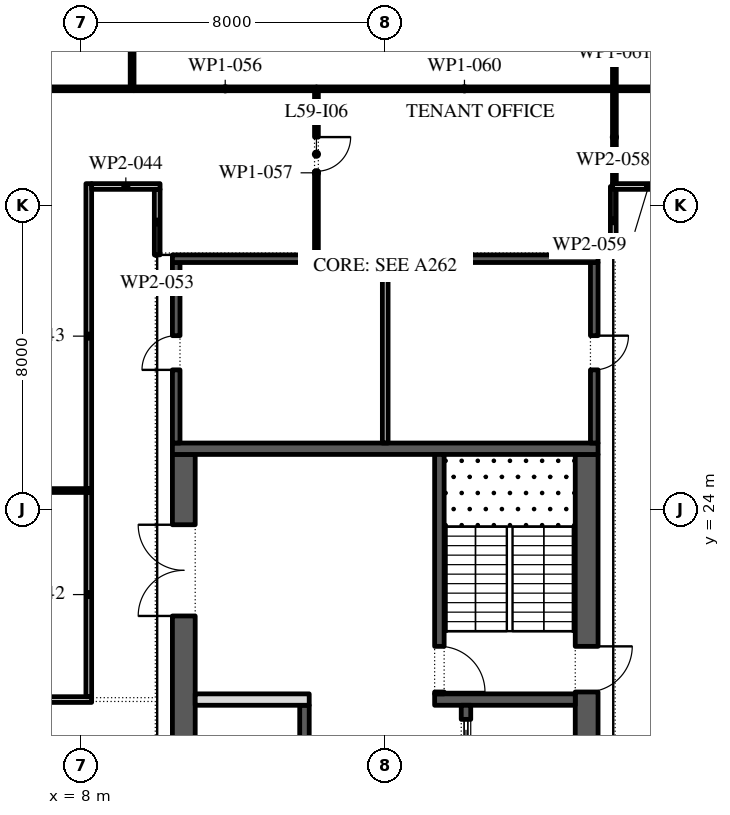
"""IFC4 building model, lengths in metres.
Left out: names, types, materials, properties, quantities, classifications, styles, units other than length and angle.
Written with IfcOpenShell. Run it as: python <this file> out.ifc"""

import sys

from ifc_helpers import new_model, si_unit, direction, frame, frame_2d, origin, place, context, subcontext, project, spatial, rectangle, extrude, element, fill, save


model = new_model("IFC4")
c1 = context("Model", 3, precision=1e-05, world=origin(), true_north=direction((0.0, 1.0)))
c2 = subcontext(c1, "Body", "Model", "MODEL_VIEW")
j1 = project(units=[si_unit("LENGTHUNIT", "METRE"), si_unit("PLANEANGLEUNIT", "RADIAN")], contexts=[c1])
p1 = place(None, origin())
s1 = spatial("IfcSite", under=j1, at=p1, CompositionType="ELEMENT")
p2 = place(p1, origin())
s2 = spatial("IfcBuilding", under=s1, at=p2, CompositionType="ELEMENT")
p3 = place(p2, frame((0.0, 0.0, 272.4)))
s3 = spatial("IfcBuildingStorey", under=s2, at=p3, CompositionType="ELEMENT", Elevation=272.4)
p4 = place(p3, frame((21.359, -11.678, 0.0), z_axis=(0.0, 0.0, 1.0), x_axis=(0.224949198343, 0.974370493275, 0.0)))
e1 = element("IfcWall", 1, at=p4, inside=s3, PredefinedType="STANDARD", context=c2, shape_type="SweptSolid", body=[
    extrude(rectangle(XDim=49.5, YDim=0.3, at=frame_2d((24.75, 0.0))), origin(), (0.0, 0.0, 1.0), 4.0),
])
p5 = place(p4, frame((1.157, 0.0, 0.45)))
e2 = element("IfcOpeningElement", 2, at=p5, cuts=e1, PredefinedType="OPENING", context=c2, shape_type="SweptSolid", body=[
    extrude(rectangle(XDim=4.5, YDim=3.05, at=frame_2d((2.25, 1.525))), frame((0.0, 0.16, 0.0), z_axis=(0.0, -1.0, 0.0), x_axis=(1.0, 0.0, 0.0)), (0.0, 0.0, 1.0), 0.32),
])
p6 = place(p4, frame((8.121, 0.0, 0.45)))
e3 = element("IfcOpeningElement", 3, at=p6, cuts=e1, PredefinedType="OPENING", context=c2, shape_type="SweptSolid", body=[
    extrude(rectangle(XDim=4.5, YDim=3.05, at=frame_2d((2.25, 1.525))), frame((0.0, 0.16, 0.0), z_axis=(0.0, -1.0, 0.0), x_axis=(1.0, 0.0, 0.0)), (0.0, 0.0, 1.0), 0.32),
])
p7 = place(p4, frame((15.236, 0.0, 0.45)))
e4 = element("IfcOpeningElement", 4, at=p7, cuts=e1, PredefinedType="OPENING", context=c2, shape_type="SweptSolid", body=[
    extrude(rectangle(XDim=4.5, YDim=3.05, at=frame_2d((2.25, 1.525))), frame((0.0, 0.16, 0.0), z_axis=(0.0, -1.0, 0.0), x_axis=(1.0, 0.0, 0.0)), (0.0, 0.0, 1.0), 0.32),
])
p8 = place(p4, frame((22.35, 0.0, 0.45)))
e5 = element("IfcOpeningElement", 5, at=p8, cuts=e1, PredefinedType="OPENING", context=c2, shape_type="SweptSolid", body=[
    extrude(rectangle(XDim=4.5, YDim=3.05, at=frame_2d((2.25, 1.525))), frame((0.0, 0.16, 0.0), z_axis=(0.0, -1.0, 0.0), x_axis=(1.0, 0.0, 0.0)), (0.0, 0.0, 1.0), 0.32),
])
p9 = place(p4, frame((29.464, 0.0, 0.45)))
e6 = element("IfcOpeningElement", 6, at=p9, cuts=e1, PredefinedType="OPENING", context=c2, shape_type="SweptSolid", body=[
    extrude(rectangle(XDim=4.5, YDim=2.95, at=frame_2d((2.25, 1.475))), frame((0.0, 0.16, 0.0), z_axis=(0.0, -1.0, 0.0), x_axis=(1.0, 0.0, 0.0)), (0.0, 0.0, 1.0), 0.32),
])
p10 = place(p4, frame((37.628, 0.0, 0.0)))
e7 = element("IfcOpeningElement", 7, at=p10, cuts=e1, PredefinedType="OPENING", context=c2, shape_type="SweptSolid", body=[
    extrude(rectangle(XDim=2.4, YDim=3.325, at=frame_2d((1.2, 1.663))), frame((0.0, 0.16, 0.0), z_axis=(0.0, -1.0, 0.0), x_axis=(1.0, 0.0, 0.0)), (0.0, 0.0, 1.0), 0.32),
])
p11 = place(p4, frame((43.693, 0.0, 0.45)))
e8 = element("IfcOpeningElement", 8, at=p11, cuts=e1, PredefinedType="OPENING", context=c2, shape_type="SweptSolid", body=[
    extrude(rectangle(XDim=4.5, YDim=3.05, at=frame_2d((2.25, 1.525))), frame((0.0, 0.16, 0.0), z_axis=(0.0, -1.0, 0.0), x_axis=(1.0, 0.0, 0.0)), (0.0, 0.0, 1.0), 0.32),
])
p12 = place(p3, frame((21.3, -2.45, 0.0), z_axis=(0.0, 0.0, 1.0), x_axis=(0.0, 1.0, 0.0)))
e9 = element("IfcWall", 9, at=p12, inside=s3, PredefinedType="SHEAR", context=c2, shape_type="SweptSolid", body=[
    extrude(rectangle(XDim=27.9, YDim=0.6, at=frame_2d((13.95, 0.0))), origin(), (0.0, 0.0, 1.0), 4.0),
])
p13 = place(p12, frame((5.05, 0.0, 0.0)))
e10 = element("IfcOpeningElement", 10, at=p13, cuts=e9, PredefinedType="OPENING", context=c2, shape_type="SweptSolid", body=[
    extrude(rectangle(XDim=1.2, YDim=2.1, at=frame_2d((0.6, 1.05))), frame((0.0, 0.31, 0.0), z_axis=(0.0, -1.0, 0.0), x_axis=(1.0, 0.0, 0.0)), (0.0, 0.0, 1.0), 0.62),
])
p14 = place(p12, frame((21.65, 0.0, 0.0)))
e11 = element("IfcOpeningElement", 11, at=p14, cuts=e9, PredefinedType="OPENING", context=c2, shape_type="SweptSolid", body=[
    extrude(rectangle(XDim=1.2, YDim=2.1, at=frame_2d((0.6, 1.05))), frame((0.0, 0.31, 0.0), z_axis=(0.0, -1.0, 0.0), x_axis=(1.0, 0.0, 0.0)), (0.0, 0.0, 1.0), 0.62),
])
p15 = place(p3, frame((10.7, -2.45, 0.0), z_axis=(0.0, 0.0, 1.0), x_axis=(0.0, 1.0, 0.0)))
e12 = element("IfcWall", 12, at=p15, inside=s3, PredefinedType="SHEAR", context=c2, shape_type="SweptSolid", body=[
    extrude(rectangle(XDim=27.9, YDim=0.6, at=frame_2d((13.95, 0.0))), origin(), (0.0, 0.0, 1.0), 4.0),
])
p16 = place(p15, frame((23.65, 0.0, 0.0)))
e13 = element("IfcOpeningElement", 13, at=p16, cuts=e12, PredefinedType="OPENING", context=c2, shape_type="SweptSolid", body=[
    extrude(rectangle(XDim=2.4, YDim=2.1, at=frame_2d((1.2, 1.05))), frame((0.0, 0.31, 0.0), z_axis=(0.0, -1.0, 0.0), x_axis=(1.0, 0.0, 0.0)), (0.0, 0.0, 1.0), 0.62),
])
p17 = place(p15, frame((1.087, 0.0, 0.0)))
e14 = element("IfcOpeningElement", 14, at=p17, cuts=e12, PredefinedType="OPENING", context=c2, shape_type="SweptSolid", body=[
    extrude(rectangle(XDim=0.9, YDim=2.1, at=frame_2d((0.45, 1.05))), frame((0.0, 0.31, 0.0), z_axis=(0.0, -1.0, 0.0), x_axis=(1.0, 0.0, 0.0)), (0.0, 0.0, 1.0), 0.62),
])
p18 = place(p15, frame((4.262, 0.0, 0.0)))
e15 = element("IfcOpeningElement", 15, at=p18, cuts=e12, PredefinedType="OPENING", context=c2, shape_type="SweptSolid", body=[
    extrude(rectangle(XDim=1.0, YDim=2.1, at=frame_2d((0.5, 1.05))), frame((0.0, 0.31, 0.0), z_axis=(0.0, -1.0, 0.0), x_axis=(1.0, 0.0, 0.0)), (0.0, 0.0, 1.0), 0.62),
])
p19 = place(p3, frame((10.4, 25.6, 0.0), z_axis=(0.0, 0.0, 1.0), x_axis=(1.0, 0.0, 0.0)))
e16 = element("IfcWall", 16, at=p19, inside=s3, PredefinedType="SHEAR", context=c2, shape_type="SweptSolid", body=[
    extrude(rectangle(XDim=11.2, YDim=0.3, at=frame_2d((5.6, 0.0))), origin(), (0.0, 0.0, 1.0), 4.0),
])
p20 = place(p3, frame((17.3, 19.0, 0.0), z_axis=(0.0, 0.0, 1.0), x_axis=(1.0, 0.0, 0.0)))
e17 = element("IfcWall", 17, at=p20, inside=s3, PredefinedType="SHEAR", context=c2, shape_type="SweptSolid", body=[
    extrude(rectangle(XDim=3.7, YDim=0.3, at=frame_2d((1.85, 0.0))), origin(), (0.0, 0.0, 1.0), 4.0),
])
p21 = place(p3, frame((17.425, 19.15, 0.0), z_axis=(0.0, 0.0, 1.0), x_axis=(0.0, 1.0, 0.0)))
e18 = element("IfcWall", 18, at=p21, inside=s3, PredefinedType="SHEAR", context=c2, shape_type="SweptSolid", body=[
    extrude(rectangle(XDim=6.3, YDim=0.25, at=frame_2d((3.15, 0.0))), origin(), (0.0, 0.0, 1.0), 4.0),
])
p22 = place(p21, frame((0.05, 0.0, 0.0)))
e19 = element("IfcOpeningElement", 19, at=p22, cuts=e18, PredefinedType="OPENING", context=c2, shape_type="SweptSolid", body=[
    extrude(rectangle(XDim=1.2, YDim=2.1, at=frame_2d((0.6, 1.05))), frame((0.0, 0.135, 0.0), z_axis=(0.0, -1.0, 0.0), x_axis=(1.0, 0.0, 0.0)), (0.0, 0.0, 1.0), 0.27),
])
p23 = place(p3, frame((18.125, 4.15, 0.0), z_axis=(0.0, 0.0, 1.0), x_axis=(0.0, 1.0, 0.0)))
e20 = element("IfcWall", 20, at=p23, inside=s3, PredefinedType="SHEAR", context=c2, shape_type="SweptSolid", body=[
    extrude(rectangle(XDim=14.7, YDim=0.25, at=frame_2d((7.35, 0.0))), origin(), (0.0, 0.0, 1.0), 4.0),
])
p24 = place(p23, frame((6.9, 0.0, 0.0)))
e21 = element("IfcOpeningElement", 21, at=p24, cuts=e20, PredefinedType="OPENING", context=c2, shape_type="SweptSolid", body=[
    extrude(rectangle(XDim=0.9, YDim=2.1, at=frame_2d((0.45, 1.05))), frame((0.0, 0.135, 0.0), z_axis=(0.0, -1.0, 0.0), x_axis=(1.0, 0.0, 0.0)), (0.0, 0.0, 1.0), 0.27),
])
p25 = place(p23, frame((0.371, 0.0, 0.0)))
e22 = element("IfcOpeningElement", 22, at=p25, cuts=e20, PredefinedType="OPENING", context=c2, shape_type="SweptSolid", body=[
    extrude(rectangle(XDim=1.1, YDim=2.1, at=frame_2d((0.55, 1.05))), frame((0.0, 0.135, 0.0), z_axis=(0.0, -1.0, 0.0), x_axis=(1.0, 0.0, 0.0)), (0.0, 0.0, 1.0), 0.27),
])
p26 = place(p23, frame((13.229, 0.0, 0.0)))
e23 = element("IfcOpeningElement", 23, at=p26, cuts=e20, PredefinedType="OPENING", context=c2, shape_type="SweptSolid", body=[
    extrude(rectangle(XDim=1.1, YDim=2.1, at=frame_2d((0.55, 1.05))), frame((0.0, 0.135, 0.0), z_axis=(0.0, -1.0, 0.0), x_axis=(1.0, 0.0, 0.0)), (0.0, 0.0, 1.0), 0.27),
])
p27 = place(p3, frame((13.875, -2.45, 0.0), z_axis=(0.0, 0.0, 1.0), x_axis=(0.0, 1.0, 0.0)))
e24 = element("IfcWall", 24, at=p27, inside=s3, PredefinedType="SHEAR", context=c2, shape_type="SweptSolid", body=[
    extrude(rectangle(XDim=21.3, YDim=0.25, at=frame_2d((10.65, 0.0))), origin(), (0.0, 0.0, 1.0), 4.0),
])
p28 = place(p27, frame((17.786, 0.0, 0.0)))
e25 = element("IfcOpeningElement", 25, at=p28, cuts=e24, PredefinedType="OPENING", context=c2, shape_type="SweptSolid", body=[
    extrude(rectangle(XDim=0.9, YDim=2.1, at=frame_2d((0.45, 1.05))), frame((0.0, 0.135, 0.0), z_axis=(0.0, -1.0, 0.0), x_axis=(1.0, 0.0, 0.0)), (0.0, 0.0, 1.0), 0.27),
])
p29 = place(p27, frame((6.971, 0.0, 0.0)))
e26 = element("IfcOpeningElement", 26, at=p29, cuts=e24, PredefinedType="OPENING", context=c2, shape_type="SweptSolid", body=[
    extrude(rectangle(XDim=1.1, YDim=2.1, at=frame_2d((0.55, 1.05))), frame((0.0, 0.135, 0.0), z_axis=(0.0, -1.0, 0.0), x_axis=(1.0, 0.0, 0.0)), (0.0, 0.0, 1.0), 0.27),
])
p30 = place(p27, frame((9.114, 0.0, 0.0)))
e27 = element("IfcOpeningElement", 27, at=p30, cuts=e24, PredefinedType="OPENING", context=c2, shape_type="SweptSolid", body=[
    extrude(rectangle(XDim=1.1, YDim=2.1, at=frame_2d((0.55, 1.05))), frame((0.0, 0.135, 0.0), z_axis=(0.0, -1.0, 0.0), x_axis=(1.0, 0.0, 0.0)), (0.0, 0.0, 1.0), 0.27),
])
p31 = place(p27, frame((11.257, 0.0, 0.0)))
e28 = element("IfcOpeningElement", 28, at=p31, cuts=e24, PredefinedType="OPENING", context=c2, shape_type="SweptSolid", body=[
    extrude(rectangle(XDim=1.1, YDim=2.1, at=frame_2d((0.55, 1.05))), frame((0.0, 0.135, 0.0), z_axis=(0.0, -1.0, 0.0), x_axis=(1.0, 0.0, 0.0)), (0.0, 0.0, 1.0), 0.27),
])
p32 = place(p27, frame((13.4, 0.0, 0.0)))
e29 = element("IfcOpeningElement", 29, at=p32, cuts=e24, PredefinedType="OPENING", context=c2, shape_type="SweptSolid", body=[
    extrude(rectangle(XDim=1.1, YDim=2.1, at=frame_2d((0.55, 1.05))), frame((0.0, 0.135, 0.0), z_axis=(0.0, -1.0, 0.0), x_axis=(1.0, 0.0, 0.0)), (0.0, 0.0, 1.0), 0.27),
])
p33 = place(p3, frame((11.0, 19.0, 0.0), z_axis=(0.0, 0.0, 1.0), x_axis=(1.0, 0.0, 0.0)))
e30 = element("IfcWall", 30, at=p33, inside=s3, PredefinedType="PARTITIONING", context=c2, shape_type="SweptSolid", body=[
    extrude(rectangle(XDim=3.0, YDim=0.3, at=frame_2d((1.5, 0.0))), origin(), (0.0, 0.0, 1.0), 4.0),
])
p34 = place(p3, frame((21.5, 25.75, 0.0), z_axis=(0.0, 0.0, 1.0), x_axis=(0.0, 1.0, 0.0)))
e31 = element("IfcWall", 31, at=p34, inside=s3, PredefinedType="SHEAR", context=c2, shape_type="SweptSolid", body=[
    extrude(rectangle(XDim=4.75, YDim=0.2, at=frame_2d((2.375, 0.0))), origin(), (0.0, 0.0, 1.0), 4.0),
])
p35 = place(p34, frame((1.925, 0.0, 0.0)))
e32 = element("IfcOpeningElement", 32, at=p35, cuts=e31, PredefinedType="OPENING", context=c2, shape_type="SweptSolid", body=[
    extrude(rectangle(XDim=0.9, YDim=2.1, at=frame_2d((0.45, 1.05))), frame((0.0, 0.11, 0.0), z_axis=(0.0, -1.0, 0.0), x_axis=(1.0, 0.0, 0.0)), (0.0, 0.0, 1.0), 0.22),
])
p36 = place(p3, frame((10.5, 25.75, 0.0), z_axis=(0.0, 0.0, 1.0), x_axis=(0.0, 1.0, 0.0)))
e33 = element("IfcWall", 33, at=p36, inside=s3, PredefinedType="SHEAR", context=c2, shape_type="SweptSolid", body=[
    extrude(rectangle(XDim=4.75, YDim=0.2, at=frame_2d((2.375, 0.0))), origin(), (0.0, 0.0, 1.0), 4.0),
])
p37 = place(p36, frame((1.925, 0.0, 0.0)))
e34 = element("IfcOpeningElement", 34, at=p37, cuts=e33, PredefinedType="OPENING", context=c2, shape_type="SweptSolid", body=[
    extrude(rectangle(XDim=0.9, YDim=2.1, at=frame_2d((0.45, 1.05))), frame((0.0, 0.11, 0.0), z_axis=(0.0, -1.0, 0.0), x_axis=(1.0, 0.0, 0.0)), (0.0, 0.0, 1.0), 0.22),
])
p38 = place(p3, frame((10.4, 30.6, 0.0), z_axis=(0.0, 0.0, 1.0), x_axis=(1.0, 0.0, 0.0)))
e35 = element("IfcWall", 35, at=p38, inside=s3, PredefinedType="SHEAR", context=c2, shape_type="SweptSolid", body=[
    extrude(rectangle(XDim=11.2, YDim=0.2, at=frame_2d((5.6, 0.0))), origin(), (0.0, 0.0, 1.0), 4.0),
])
p39 = place(p3, frame((16.0, 25.75, 0.0), z_axis=(0.0, 0.0, 1.0), x_axis=(0.0, 1.0, 0.0)))
e36 = element("IfcWall", 36, at=p39, inside=s3, PredefinedType="PARTITIONING", context=c2, shape_type="SweptSolid", body=[
    extrude(rectangle(XDim=4.75, YDim=0.15, at=frame_2d((2.375, 0.0))), origin(), (0.0, 0.0, 1.0), 4.0),
])
p40 = place(p3, frame((0.915, 19.0, 0.0), z_axis=(0.0, 0.0, 1.0), x_axis=(1.0, 0.0, 0.0)))
e37 = element("IfcWall", 37, at=p40, inside=s3, PredefinedType="PARTITIONING", context=c2, shape_type="SweptSolid", body=[
    extrude(rectangle(XDim=7.36, YDim=0.15, at=frame_2d((3.68, 0.0))), origin(), (0.0, 0.0, 1.0), 4.0),
])
p41 = place(p40, frame((4.635, 0.0, 0.0)))
e38 = element("IfcOpeningElement", 38, at=p41, cuts=e37, PredefinedType="OPENING", context=c2, shape_type="SweptSolid", body=[
    extrude(rectangle(XDim=1.0, YDim=2.1, at=frame_2d((0.5, 1.05))), frame((0.0, 0.085, 0.0), z_axis=(0.0, -1.0, 0.0), x_axis=(1.0, 0.0, 0.0)), (0.0, 0.0, 1.0), 0.17),
])
p42 = place(p3, frame((1.065, 24.5, 0.0), z_axis=(0.0, 0.0, 1.0), x_axis=(1.0, 0.0, 0.0)))
e39 = element("IfcWall", 39, at=p42, inside=s3, PredefinedType="PARTITIONING", context=c2, shape_type="SweptSolid", body=[
    extrude(rectangle(XDim=7.21, YDim=0.1, at=frame_2d((3.605, 0.0))), origin(), (0.0, 0.0, 1.0), 4.0),
])
p43 = place(p3, frame((8.2, 19.075, 0.0), z_axis=(0.0, 0.0, 1.0), x_axis=(0.0, 1.0, 0.0)))
e40 = element("IfcWall", 40, at=p43, inside=s3, PredefinedType="PARTITIONING", context=c2, shape_type="SweptSolid", body=[
    extrude(rectangle(XDim=5.375, YDim=0.15, at=frame_2d((2.688, 0.0))), origin(), (0.0, 0.0, 1.0), 4.0),
])
p44 = place(p3, frame((8.2, 24.55, 0.0), z_axis=(0.0, 0.0, 1.0), x_axis=(0.0, 1.0, 0.0)))
e41 = element("IfcWall", 41, at=p44, inside=s3, PredefinedType="PARTITIONING", context=c2, shape_type="SweptSolid", body=[
    extrude(rectangle(XDim=8.025, YDim=0.15, at=frame_2d((4.012, 0.0))), origin(), (0.0, 0.0, 1.0), 4.0),
])
p45 = place(p3, frame((8.275, 32.5, 0.0), z_axis=(0.0, 0.0, 1.0), x_axis=(1.0, 0.0, 0.0)))
e42 = element("IfcWall", 42, at=p45, inside=s3, PredefinedType="PARTITIONING", context=c2, shape_type="SweptSolid", body=[
    extrude(rectangle(XDim=1.8, YDim=0.15, at=frame_2d((0.9, 0.0))), origin(), (0.0, 0.0, 1.0), 4.0),
])
p46 = place(p3, frame((9.39, 35.07, 0.0), z_axis=(0.0, 0.0, 1.0), x_axis=(-1.0, 0.0, 0.0)))
e43 = element("IfcWall", 43, at=p46, inside=s3, PredefinedType="PARTITIONING", context=c2, shape_type="SweptSolid", body=[
    extrude(rectangle(XDim=8.325, YDim=0.1, at=frame_2d((4.163, 0.0))), origin(), (0.0, 0.0, 1.0), 4.0),
])
p47 = place(p3, frame((9.34, 35.12, 0.0), z_axis=(0.0, 0.0, 1.0), x_axis=(0.0, 1.0, 0.0)))
e44 = element("IfcWall", 44, at=p47, inside=s3, PredefinedType="PARTITIONING", context=c2, shape_type="SweptSolid", body=[
    extrude(rectangle(XDim=6.43, YDim=0.1, at=frame_2d((3.215, 0.0))), origin(), (0.0, 0.0, 1.0), 4.0),
])
p48 = place(p47, frame((3.9, 0.0, 0.0)))
e45 = element("IfcOpeningElement", 45, at=p48, cuts=e44, PredefinedType="OPENING", context=c2, shape_type="SweptSolid", body=[
    extrude(rectangle(XDim=0.9, YDim=2.1, at=frame_2d((0.45, 1.05))), frame((0.0, 0.06, 0.0), z_axis=(0.0, -1.0, 0.0), x_axis=(1.0, 0.0, 0.0)), (0.0, 0.0, 1.0), 0.12),
])
p49 = place(p3, frame((10.0, 32.425, 0.0), z_axis=(0.0, 0.0, 1.0), x_axis=(0.0, -1.0, 0.0)))
e46 = element("IfcWall", 46, at=p49, inside=s3, PredefinedType="PARTITIONING", context=c2, shape_type="SweptSolid", body=[
    extrude(rectangle(XDim=1.725, YDim=0.15, at=frame_2d((0.863, 0.0))), origin(), (0.0, 0.0, 1.0), 4.0),
])
p50 = place(p3, frame((14.19, 35.07, 0.0), z_axis=(0.0, 0.0, 1.0), x_axis=(-1.0, 0.0, 0.0)))
e47 = element("IfcWall", 47, at=p50, inside=s3, PredefinedType="PARTITIONING", context=c2, shape_type="SweptSolid", body=[
    extrude(rectangle(XDim=4.8, YDim=0.1, at=frame_2d((2.4, 0.0))), origin(), (0.0, 0.0, 1.0), 4.0),
])
p51 = place(p3, frame((14.19, 35.02, 0.0), z_axis=(0.0, 0.0, 1.0), x_axis=(0.0, -1.0, 0.0)))
e48 = element("IfcWall", 48, at=p51, inside=s3, PredefinedType="PARTITIONING", context=c2, shape_type="SweptSolid", body=[
    extrude(rectangle(XDim=4.32, YDim=0.1, at=frame_2d((2.16, 0.0))), origin(), (0.0, 0.0, 1.0), 4.0),
])
p52 = place(p51, frame((1.22, 0.0, 0.0)))
e49 = element("IfcOpeningElement", 49, at=p52, cuts=e48, PredefinedType="OPENING", context=c2, shape_type="SweptSolid", body=[
    extrude(rectangle(XDim=0.9, YDim=2.1, at=frame_2d((0.45, 1.05))), frame((0.0, 0.06, 0.0), z_axis=(0.0, -1.0, 0.0), x_axis=(1.0, 0.0, 0.0)), (0.0, 0.0, 1.0), 0.12),
])
p53 = place(p3, frame((22.0, 30.7, 0.0), z_axis=(0.0, 0.0, 1.0), x_axis=(0.0, 1.0, 0.0)))
e50 = element("IfcWall", 50, at=p53, inside=s3, PredefinedType="PARTITIONING", context=c2, shape_type="SweptSolid", body=[
    extrude(rectangle(XDim=1.8, YDim=0.15, at=frame_2d((0.9, 0.0))), origin(), (0.0, 0.0, 1.0), 4.0),
])
p54 = place(p3, frame((21.98, 32.5, 0.0), z_axis=(0.0, 0.0, 1.0), x_axis=(1.0, 0.0, 0.0)))
e51 = element("IfcWall", 51, at=p54, inside=s3, PredefinedType="PARTITIONING", context=c2, shape_type="SweptSolid", body=[
    extrude(rectangle(XDim=1.895, YDim=0.15, at=frame_2d((0.948, 0.0))), origin(), (0.0, 0.0, 1.0), 4.0),
])
p55 = place(p3, frame((21.98, 35.07, 0.0), z_axis=(0.0, 0.0, 1.0), x_axis=(-1.0, 0.0, 0.0)))
e52 = element("IfcWall", 52, at=p55, inside=s3, PredefinedType="PARTITIONING", context=c2, shape_type="SweptSolid", body=[
    extrude(rectangle(XDim=7.79, YDim=0.1, at=frame_2d((3.895, 0.0))), origin(), (0.0, 0.0, 1.0), 4.0),
])
p56 = place(p3, frame((22.03, 35.02, 0.0), z_axis=(0.0, 0.0, 1.0), x_axis=(0.0, -1.0, 0.0)))
e53 = element("IfcWall", 53, at=p56, inside=s3, PredefinedType="PARTITIONING", context=c2, shape_type="SweptSolid", body=[
    extrude(rectangle(XDim=2.445, YDim=0.1, at=frame_2d((1.223, 0.0))), origin(), (0.0, 0.0, 1.0), 4.0),
])
p57 = place(p3, frame((21.98, 35.07, 0.0), z_axis=(0.0, 0.0, 1.0), x_axis=(1.0, 0.0, 0.0)))
e54 = element("IfcWall", 54, at=p57, inside=s3, PredefinedType="PARTITIONING", context=c2, shape_type="SweptSolid", body=[
    extrude(rectangle(XDim=8.55, YDim=0.1, at=frame_2d((4.275, 0.0))), origin(), (0.0, 0.0, 1.0), 4.0),
])
p58 = place(p57, frame((2.15, 0.0, 0.0)))
e55 = element("IfcOpeningElement", 55, at=p58, cuts=e54, PredefinedType="OPENING", context=c2, shape_type="SweptSolid", body=[
    extrude(rectangle(XDim=0.9, YDim=2.1, at=frame_2d((0.45, 1.05))), frame((0.0, 0.06, 0.0), z_axis=(0.0, -1.0, 0.0), x_axis=(1.0, 0.0, 0.0)), (0.0, 0.0, 1.0), 0.12),
])
p59 = place(p3, frame((22.03, 42.438, 0.0), z_axis=(0.0, 0.0, 1.0), x_axis=(0.0, -1.0, 0.0)))
e56 = element("IfcWall", 56, at=p59, inside=s3, PredefinedType="PARTITIONING", context=c2, shape_type="SweptSolid", body=[
    extrude(rectangle(XDim=7.318, YDim=0.1, at=frame_2d((3.659, 0.0))), origin(), (0.0, 0.0, 1.0), 4.0),
])
p60 = place(p26, origin())
e57 = element("IfcDoor", 57, at=p60, inside=s3, OperationType="SLIDING_TO_LEFT", PredefinedType="DOOR", context=c2, shape_type="SweptSolid", body=[
    extrude(rectangle(XDim=1.1, YDim=2.1, at=frame_2d((0.55, 1.05))), frame((0.0, 0.025, 0.0), z_axis=(0.0, -1.0, 0.0), x_axis=(1.0, 0.0, 0.0)), (0.0, 0.0, 1.0), 0.05),
])
fill(e23, e57)
p61 = place(p16, origin())
e58 = element("IfcDoor", 58, at=p61, inside=s3, OperationType="DOUBLE_DOOR_SINGLE_SWING", PredefinedType="DOOR", context=c2, shape_type="SweptSolid", body=[
    extrude(rectangle(XDim=2.4, YDim=2.1, at=frame_2d((1.2, 1.05))), frame((0.0, 0.025, 0.0), z_axis=(0.0, -1.0, 0.0), x_axis=(1.0, 0.0, 0.0)), (0.0, 0.0, 1.0), 0.05),
])
fill(e13, e58)
p62 = place(p22, frame((1.2, 0.0, 0.0), z_axis=(0.0, 0.0, 1.0), x_axis=(-1.0, 0.0, 0.0)))
e59 = element("IfcDoor", 59, at=p62, inside=s3, OperationType="SINGLE_SWING_LEFT", PredefinedType="DOOR", context=c2, shape_type="SweptSolid", body=[
    extrude(rectangle(XDim=1.2, YDim=2.1, at=frame_2d((0.6, 1.05))), frame((0.0, 0.025, 0.0), z_axis=(0.0, -1.0, 0.0), x_axis=(1.0, 0.0, 0.0)), (0.0, 0.0, 1.0), 0.05),
])
fill(e19, e59)
p63 = place(p14, frame((1.2, 0.0, 0.0), z_axis=(0.0, 0.0, 1.0), x_axis=(-1.0, 0.0, 0.0)))
e60 = element("IfcDoor", 60, at=p63, inside=s3, OperationType="SINGLE_SWING_RIGHT", PredefinedType="DOOR", context=c2, shape_type="SweptSolid", body=[
    extrude(rectangle(XDim=1.2, YDim=2.1, at=frame_2d((0.6, 1.05))), frame((0.0, 0.025, 0.0), z_axis=(0.0, -1.0, 0.0), x_axis=(1.0, 0.0, 0.0)), (0.0, 0.0, 1.0), 0.05),
])
fill(e11, e60)
p64 = place(p35, frame((0.9, 0.15, 0.0), z_axis=(0.0, 0.0, 1.0), x_axis=(-1.0, 0.0, 0.0)))
e61 = element("IfcDoor", 61, at=p64, inside=s3, OperationType="SINGLE_SWING_RIGHT", PredefinedType="DOOR", context=c2, shape_type="SweptSolid", body=[
    extrude(rectangle(XDim=0.9, YDim=2.1, at=frame_2d((0.45, 1.05))), frame((0.0, 0.1, 0.0), z_axis=(0.0, -1.0, 0.0), x_axis=(1.0, 0.0, 0.0)), (0.0, 0.0, 1.0), 0.05),
])
fill(e32, e61)
p65 = place(p37, origin())
e62 = element("IfcDoor", 62, at=p65, inside=s3, OperationType="SINGLE_SWING_RIGHT", PredefinedType="DOOR", context=c2, shape_type="SweptSolid", body=[
    extrude(rectangle(XDim=0.9, YDim=2.1, at=frame_2d((0.45, 1.05))), frame((0.0, -0.05, 0.0), z_axis=(0.0, -1.0, 0.0), x_axis=(1.0, 0.0, 0.0)), (0.0, 0.0, 1.0), 0.05),
])
fill(e34, e62)
p66 = place(p52, origin())
e63 = element("IfcDoor", 63, at=p66, inside=s3, OperationType="SINGLE_SWING_RIGHT", PredefinedType="DOOR", context=c2, shape_type="SweptSolid", body=[
    extrude(rectangle(XDim=0.9, YDim=2.1, at=frame_2d((0.45, 1.05))), frame((0.0, 0.025, 0.0), z_axis=(0.0, -1.0, 0.0), x_axis=(1.0, 0.0, 0.0)), (0.0, 0.0, 1.0), 0.05),
])
fill(e49, e63)
save(model, sys.argv[1])
